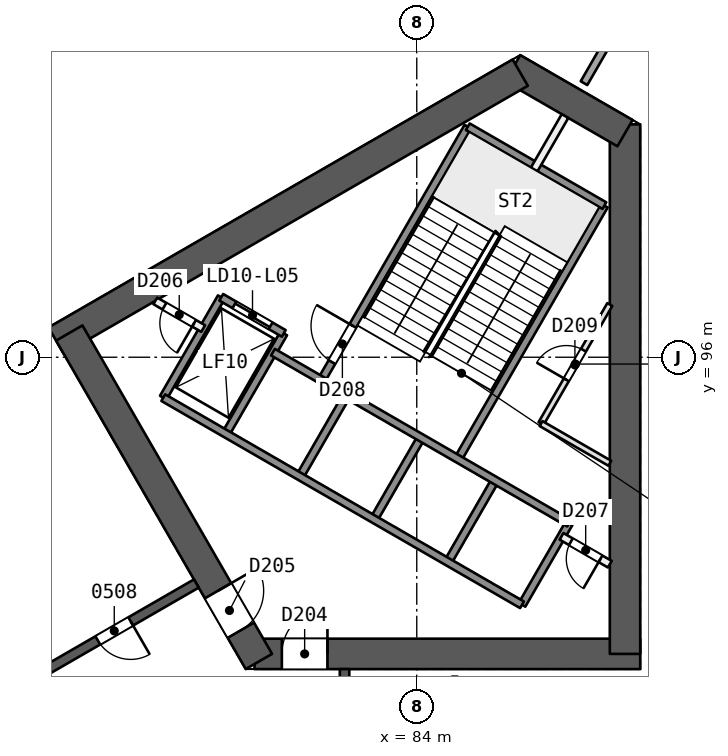
"""IFC4 building model, lengths in metres.
Left out: names, types, materials, properties, quantities, classifications, styles, units other than length and angle.
Written with IfcOpenShell. Run it as: python <this file> out.ifc"""

import sys

from ifc_helpers import new_model, si_unit, direction, frame, frame_2d, origin, place, context, subcontext, project, spatial, rectangle, extrude, element, fill, save


model = new_model("IFC4")
c1 = context("Model", 3, precision=1e-05, world=origin(), true_north=direction((0.0, 1.0)))
c2 = subcontext(c1, "Body", "Model", "MODEL_VIEW")
j1 = project(units=[si_unit("LENGTHUNIT", "METRE"), si_unit("PLANEANGLEUNIT", "RADIAN")], contexts=[c1])
p1 = place(None, origin())
s1 = spatial("IfcSite", under=j1, at=p1, CompositionType="ELEMENT")
p2 = place(p1, origin())
s2 = spatial("IfcBuilding", under=s1, at=p2, CompositionType="ELEMENT")
p3 = place(p2, frame((0.0, 0.0, 30.0)))
s3 = spatial("IfcBuildingStorey", under=s2, at=p3, CompositionType="ELEMENT", Elevation=30.0)
p4 = place(p3, frame((79.731, 88.194, 0.0), z_axis=(0.0, 0.0, 1.0), x_axis=(1.0, 0.0, 0.0)))
e1 = element("IfcWall", 1, at=p4, inside=s3, PredefinedType="SHEAR", context=c2, shape_type="SweptSolid", body=[
    extrude(rectangle(XDim=10.149, YDim=0.8, at=frame_2d((5.074, 0.0))), origin(), (0.0, 0.0, 1.0), 3.7),
])
p5 = place(p4, frame((0.719, 0.0, 0.0)))
e2 = element("IfcOpeningElement", 2, at=p5, cuts=e1, PredefinedType="OPENING", context=c2, shape_type="SweptSolid", body=[
    extrude(rectangle(XDim=1.2, YDim=2.1, at=frame_2d((0.6, 1.05))), frame((0.0, 0.411, 0.0), z_axis=(0.0, -1.0, 0.0), x_axis=(1.0, 0.0, 0.0)), (0.0, 0.0, 1.0), 0.821),
])
p6 = place(p3, frame((89.48, 88.194, 0.0), z_axis=(0.0, 0.0, 1.0), x_axis=(0.0, 1.0, 0.0)))
e3 = element("IfcWall", 3, at=p6, inside=s3, PredefinedType="SHEAR", context=c2, shape_type="SweptSolid", body=[
    extrude(rectangle(XDim=13.933, YDim=0.8, at=frame_2d((6.967, 0.0))), origin(), (0.0, 0.0, 1.0), 3.7),
])
p7 = place(p3, frame((89.48, 101.897, 0.0), z_axis=(0.0, 0.0, 1.0), x_axis=(-0.866034355626, 0.499984494636, 0.0)))
e4 = element("IfcWall", 4, at=p7, inside=s3, PredefinedType="SHEAR", context=c2, shape_type="SweptSolid", body=[
    extrude(rectangle(XDim=3.414, YDim=0.8, at=frame_2d((1.707, 0.0))), origin(), (0.0, 0.0, 1.0), 3.7),
])
p8 = place(p3, frame((86.723, 103.488, 0.0), z_axis=(0.0, 0.0, 1.0), x_axis=(-0.866032504327, -0.499987701298, 0.0)))
e5 = element("IfcWall", 5, at=p8, inside=s3, PredefinedType="SHEAR", context=c2, shape_type="SweptSolid", body=[
    extrude(rectangle(XDim=14.102, YDim=0.8, at=frame_2d((7.051, 0.0))), origin(), (0.0, 0.0, 1.0), 3.7),
])
p9 = place(p3, frame((74.856, 96.637, 0.0), z_axis=(0.0, 0.0, 1.0), x_axis=(0.499993500917, -0.866029155999, 0.0)))
e6 = element("IfcWall", 6, at=p9, inside=s3, PredefinedType="SHEAR", context=c2, shape_type="SweptSolid", body=[
    extrude(rectangle(XDim=9.98, YDim=0.8, at=frame_2d((4.99, 0.0))), origin(), (0.0, 0.0, 1.0), 3.7),
])
p10 = place(p9, frame((7.83, 0.0, 0.0)))
e7 = element("IfcOpeningElement", 7, at=p10, cuts=e6, PredefinedType="OPENING", context=c2, shape_type="SweptSolid", body=[
    extrude(rectangle(XDim=1.2, YDim=2.1, at=frame_2d((0.6, 1.05))), frame((0.0, 0.411, 0.0), z_axis=(0.0, -1.0, 0.0), x_axis=(1.0, 0.0, 0.0)), (0.0, 0.0, 1.0), 0.821),
])
p11 = place(p3, frame((82.1, 72.206, 0.0), z_axis=(0.0, 0.0, 1.0), x_axis=(0.0, 1.0, 0.0)))
e8 = element("IfcWall", 8, at=p11, inside=s3, PredefinedType="SHEAR", context=c2, shape_type="SweptSolid", body=[
    extrude(rectangle(XDim=15.588, YDim=0.25, at=frame_2d((7.794, 0.0))), origin(), (0.0, 0.0, 1.0), 3.2),
])
p12 = place(p11, frame((2.618, 0.0, 0.0)))
e9 = element("IfcOpeningElement", 9, at=p12, cuts=e8, PredefinedType="OPENING", context=c2, shape_type="SweptSolid", body=[
    extrude(rectangle(XDim=1.0, YDim=2.1, at=frame_2d((0.5, 1.05))), frame((0.0, 0.135, 0.0), z_axis=(0.0, -1.0, 0.0), x_axis=(1.0, 0.0, 0.0)), (0.0, 0.0, 1.0), 0.271),
])
p13 = place(p11, frame((9.25, 0.0, 0.0)))
e10 = element("IfcOpeningElement", 10, at=p13, cuts=e8, PredefinedType="OPENING", context=c2, shape_type="SweptSolid", body=[
    extrude(rectangle(XDim=1.1, YDim=2.1, at=frame_2d((0.55, 1.05))), frame((0.0, 0.135, 0.0), z_axis=(0.0, -1.0, 0.0), x_axis=(1.0, 0.0, 0.0)), (0.0, 0.0, 1.0), 0.271),
])
p14 = place(p11, frame((11.294, 0.0, 0.0)))
e11 = element("IfcOpeningElement", 11, at=p14, cuts=e8, PredefinedType="OPENING", context=c2, shape_type="SweptSolid", body=[
    extrude(rectangle(XDim=1.0, YDim=2.1, at=frame_2d((0.5, 1.05))), frame((0.0, 0.135, 0.0), z_axis=(0.0, -1.0, 0.0), x_axis=(1.0, 0.0, 0.0)), (0.0, 0.0, 1.0), 0.271),
])
p15 = place(p3, frame((78.2, 90.046, 0.0), z_axis=(0.0, 0.0, 1.0), x_axis=(-0.866026492143, -0.499998114903, 0.0)))
e12 = element("IfcWall", 12, at=p15, inside=s3, PredefinedType="SHEAR", context=c2, shape_type="SweptSolid", body=[
    extrude(rectangle(XDim=15.588, YDim=0.25, at=frame_2d((7.794, 0.0))), origin(), (0.0, 0.0, 1.0), 3.2),
])
p16 = place(p15, frame((1.994, 0.0, 0.0)))
e13 = element("IfcOpeningElement", 13, at=p16, cuts=e12, PredefinedType="OPENING", context=c2, shape_type="SweptSolid", body=[
    extrude(rectangle(XDim=1.0, YDim=2.1, at=frame_2d((0.5, 1.05))), frame((0.0, 0.135, 0.0), z_axis=(0.0, -1.0, 0.0), x_axis=(1.0, 0.0, 0.0)), (0.0, 0.0, 1.0), 0.271),
])
p17 = place(p15, frame((8.85, 0.0, 0.0)))
e14 = element("IfcOpeningElement", 14, at=p17, cuts=e12, PredefinedType="OPENING", context=c2, shape_type="SweptSolid", body=[
    extrude(rectangle(XDim=1.1, YDim=2.1, at=frame_2d((0.55, 1.05))), frame((0.0, 0.135, 0.0), z_axis=(0.0, -1.0, 0.0), x_axis=(1.0, 0.0, 0.0)), (0.0, 0.0, 1.0), 0.271),
])
p18 = place(p15, frame((12.75, 0.0, 0.0)))
e15 = element("IfcOpeningElement", 15, at=p18, cuts=e12, PredefinedType="OPENING", context=c2, shape_type="SweptSolid", body=[
    extrude(rectangle(XDim=1.0, YDim=2.1, at=frame_2d((0.5, 1.05))), frame((0.0, 0.135, 0.0), z_axis=(0.0, -1.0, 0.0), x_axis=(1.0, 0.0, 0.0)), (0.0, 0.0, 1.0), 0.271),
])
p19 = place(p3, frame((85.0, 87.595, 0.0), z_axis=(0.0, 0.0, 1.0), x_axis=(0.0, -1.0, 0.0)))
e16 = element("IfcWall", 16, at=p19, inside=s3, PredefinedType="PARTITIONING", context=c2, shape_type="SweptSolid", body=[
    extrude(rectangle(XDim=2.401, YDim=0.15, at=frame_2d((1.2, 0.0))), origin(), (0.0, 0.0, 1.0), 3.2),
])
p20 = place(p3, frame((93.686, 112.365, 0.0), z_axis=(0.0, 0.0, 1.0), x_axis=(-0.499997037832, -0.866027113986, 0.0)))
e17 = element("IfcWall", 17, at=p20, inside=s3, PredefinedType="PARTITIONING", context=c2, shape_type="SweptSolid", body=[
    extrude(rectangle(XDim=10.57, YDim=0.2, at=frame_2d((5.285, 0.0))), origin(), (0.0, 0.0, 1.0), 3.2),
])
p21 = place(p3, frame((37.479, 83.163, 0.0), z_axis=(0.0, 0.0, 1.0), x_axis=(0.866024340432, 0.500001841776, 0.0)))
e18 = element("IfcWall", 18, at=p21, inside=s3, PredefinedType="SOLIDWALL", context=c2, shape_type="SweptSolid", body=[
    extrude(rectangle(XDim=61.824, YDim=0.3, at=frame_2d((30.912, 0.0))), origin(), (0.0, 0.0, 1.0), 3.2),
])
p22 = place(p21, frame((29.556, 0.0, 0.0)))
e19 = element("IfcOpeningElement", 19, at=p22, cuts=e18, PredefinedType="OPENING", context=c2, shape_type="SweptSolid", body=[
    extrude(rectangle(XDim=2.4, YDim=2.4, at=frame_2d((1.2, 1.2))), frame((0.0, 0.161, 0.0), z_axis=(0.0, -1.0, 0.0), x_axis=(1.0, 0.0, 0.0)), (0.0, 0.0, 1.0), 0.321),
])
p23 = place(p21, frame((35.012, 0.0, 0.0)))
e20 = element("IfcOpeningElement", 20, at=p23, cuts=e18, PredefinedType="OPENING", context=c2, shape_type="SweptSolid", body=[
    extrude(rectangle(XDim=2.4, YDim=2.4, at=frame_2d((1.2, 1.2))), frame((0.0, 0.161, 0.0), z_axis=(0.0, -1.0, 0.0), x_axis=(1.0, 0.0, 0.0)), (0.0, 0.0, 1.0), 0.321),
])
p24 = place(p21, frame((47.93, 0.0, 0.0)))
e21 = element("IfcOpeningElement", 21, at=p24, cuts=e18, PredefinedType="OPENING", context=c2, shape_type="SweptSolid", body=[
    extrude(rectangle(XDim=2.4, YDim=2.4, at=frame_2d((1.2, 1.2))), frame((0.0, 0.161, 0.0), z_axis=(0.0, -1.0, 0.0), x_axis=(1.0, 0.0, 0.0)), (0.0, 0.0, 1.0), 0.321),
])
p25 = place(p21, frame((24.256, 0.0, 0.0)))
e22 = element("IfcOpeningElement", 22, at=p25, cuts=e18, PredefinedType="OPENING", context=c2, shape_type="SweptSolid", body=[
    extrude(rectangle(XDim=2.4, YDim=2.4, at=frame_2d((1.2, 1.2))), frame((0.0, 0.161, 0.0), z_axis=(0.0, -1.0, 0.0), x_axis=(1.0, 0.0, 0.0)), (0.0, 0.0, 1.0), 0.321),
])
p26 = place(p21, frame((11.509, 0.0, 0.0)))
e23 = element("IfcOpeningElement", 23, at=p26, cuts=e18, PredefinedType="OPENING", context=c2, shape_type="SweptSolid", body=[
    extrude(rectangle(XDim=2.4, YDim=2.4, at=frame_2d((1.2, 1.2))), frame((0.0, 0.161, 0.0), z_axis=(0.0, -1.0, 0.0), x_axis=(1.0, 0.0, 0.0)), (0.0, 0.0, 1.0), 0.321),
])
p27 = place(p3, frame((86.77, 89.486, 0.0), z_axis=(0.0, 0.0, 1.0), x_axis=(0.499961042966, 0.86604789447, 0.0)))
e24 = element("IfcWall", 24, at=p27, inside=s3, PredefinedType="SOLIDWALL", context=c2, shape_type="SweptSolid", body=[
    extrude(rectangle(XDim=2.48, YDim=0.2, at=frame_2d((1.24, 0.0))), origin(), (0.0, 0.0, 1.0), 3.2),
])
p28 = place(p3, frame((87.271, 94.254, 0.0), z_axis=(0.0, 0.0, 1.0), x_axis=(0.500043727655, 0.866000156139, 0.0)))
e25 = element("IfcWall", 25, at=p28, inside=s3, PredefinedType="PARTITIONING", context=c2, shape_type="SweptSolid", body=[
    extrude(rectangle(XDim=3.618, YDim=0.15, at=frame_2d((1.809, 0.0))), origin(), (0.0, 0.0, 1.0), 3.2),
])
p29 = place(p28, frame((1.332, 0.0, 0.0)))
e26 = element("IfcOpeningElement", 26, at=p29, cuts=e25, PredefinedType="OPENING", context=c2, shape_type="SweptSolid", body=[
    extrude(rectangle(XDim=0.9, YDim=2.1, at=frame_2d((0.45, 1.05))), frame((0.0, 0.085, 0.0), z_axis=(0.0, -1.0, 0.0), x_axis=(1.0, 0.0, 0.0)), (0.0, 0.0, 1.0), 0.171),
])
p30 = place(p3, frame((84.821, 90.611, 0.0), z_axis=(0.0, 0.0, 1.0), x_axis=(0.499961042966, 0.86604789447, 0.0)))
e27 = element("IfcWall", 27, at=p30, inside=s3, PredefinedType="SOLIDWALL", context=c2, shape_type="SweptSolid", body=[
    extrude(rectangle(XDim=2.48, YDim=0.2, at=frame_2d((1.24, 0.0))), origin(), (0.0, 0.0, 1.0), 3.2),
])
p31 = place(p3, frame((85.087, 93.321, 0.0), z_axis=(0.0, 0.0, 1.0), x_axis=(0.500019787375, 0.866013979237, 0.0)))
e28 = element("IfcWall", 28, at=p31, inside=s3, PredefinedType="SOLIDWALL", context=c2, shape_type="SweptSolid", body=[
    extrude(rectangle(XDim=7.7, YDim=0.2, at=frame_2d((3.85, 0.0))), origin(), (0.0, 0.0, 1.0), 3.2),
])
p32 = place(p3, frame((82.873, 91.736, 0.0), z_axis=(0.0, 0.0, 1.0), x_axis=(0.499961042966, 0.86604789447, 0.0)))
e29 = element("IfcWall", 29, at=p32, inside=s3, PredefinedType="SOLIDWALL", context=c2, shape_type="SweptSolid", body=[
    extrude(rectangle(XDim=2.48, YDim=0.2, at=frame_2d((1.24, 0.0))), origin(), (0.0, 0.0, 1.0), 3.2),
])
p33 = place(p3, frame((87.09, 100.94, 0.0), z_axis=(0.0, 0.0, 1.0), x_axis=(0.499956811548, 0.866050337213, 0.0)))
e30 = element("IfcWall", 30, at=p33, inside=s3, PredefinedType="PARTITIONING", context=c2, shape_type="SweptSolid", body=[
    extrude(rectangle(XDim=1.623, YDim=0.2, at=frame_2d((0.812, 0.0))), origin(), (0.0, 0.0, 1.0), 3.2),
])
p34 = place(p3, frame((80.924, 92.861, 0.0), z_axis=(0.0, 0.0, 1.0), x_axis=(0.499961042966, 0.86604789447, 0.0)))
e31 = element("IfcWall", 31, at=p34, inside=s3, PredefinedType="SOLIDWALL", context=c2, shape_type="SweptSolid", body=[
    extrude(rectangle(XDim=2.48, YDim=0.2, at=frame_2d((1.24, 0.0))), origin(), (0.0, 0.0, 1.0), 3.2),
])
p35 = place(p3, frame((81.493, 95.396, 0.0), z_axis=(0.0, 0.0, 1.0), x_axis=(0.500006057782, 0.866021906294, 0.0)))
e32 = element("IfcWall", 32, at=p35, inside=s3, PredefinedType="SOLIDWALL", context=c2, shape_type="SweptSolid", body=[
    extrude(rectangle(XDim=7.7, YDim=0.2, at=frame_2d((3.85, 0.0))), origin(), (0.0, 0.0, 1.0), 3.2),
])
p36 = place(p35, frame((0.55, 0.0, 0.0)))
e33 = element("IfcOpeningElement", 33, at=p36, cuts=e32, PredefinedType="OPENING", context=c2, shape_type="SweptSolid", body=[
    extrude(rectangle(XDim=1.1, YDim=2.1, at=frame_2d((0.55, 1.05))), frame((0.0, 0.11, 0.0), z_axis=(0.0, -1.0, 0.0), x_axis=(1.0, 0.0, 0.0)), (0.0, 0.0, 1.0), 0.221),
])
for number, where, z_axis, x_axis in (
    (34, (78.976, 93.986, 0.0), (0.0, 0.0, 1.0), (0.5, 0.866, 0.0)),
    (35, (77.33, 94.936, 0.0), (0.0, 0.0, 1.0), (0.5, 0.866, 0.0)),
):
    element("IfcWall", number, at=place(p3, frame(where, z_axis=z_axis, x_axis=x_axis)), inside=s3, PredefinedType="SOLIDWALL", context=c2, shape_type="SweptSolid", body=[
        extrude(rectangle(XDim=3.05, YDim=0.2, at=frame_2d((1.525, 0.0))), origin(), (0.0, 0.0, 1.0), 3.2),
    ])
p37 = place(p3, frame((86.77, 89.486, 0.0), z_axis=(0.0, 0.0, 1.0), x_axis=(-0.86601811187, 0.500012629753, 0.0)))
e36 = element("IfcWall", 36, at=p37, inside=s3, PredefinedType="SOLIDWALL", context=c2, shape_type="SweptSolid", body=[
    extrude(rectangle(XDim=10.9, YDim=0.2, at=frame_2d((5.45, 0.0))), origin(), (0.0, 0.0, 1.0), 3.2),
])
p38 = place(p3, frame((89.08, 90.554, 0.0), z_axis=(0.0, 0.0, 1.0), x_axis=(-0.866022048785, 0.500005810984, 0.0)))
e37 = element("IfcWall", 37, at=p38, inside=s3, PredefinedType="PARTITIONING", context=c2, shape_type="SweptSolid", body=[
    extrude(rectangle(XDim=1.467, YDim=0.2, at=frame_2d((0.733, 0.0))), origin(), (0.0, 0.0, 1.0), 3.2),
])
p39 = place(p38, frame((0.283, 0.0, 0.0)))
e38 = element("IfcOpeningElement", 38, at=p39, cuts=e37, PredefinedType="OPENING", context=c2, shape_type="SweptSolid", body=[
    extrude(rectangle(XDim=0.9, YDim=2.1, at=frame_2d((0.45, 1.05))), frame((0.0, 0.11, 0.0), z_axis=(0.0, -1.0, 0.0), x_axis=(1.0, 0.0, 0.0)), (0.0, 0.0, 1.0), 0.221),
])
p40 = place(p3, frame((78.38, 96.755, 0.0), z_axis=(0.0, 0.0, 1.0), x_axis=(-0.866003949776, 0.500037157592, 0.0)))
e39 = element("IfcWall", 39, at=p40, inside=s3, PredefinedType="PARTITIONING", context=c2, shape_type="SweptSolid", body=[
    extrude(rectangle(XDim=1.455, YDim=0.2, at=frame_2d((0.728, 0.0))), origin(), (0.0, 0.0, 1.0), 3.2),
])
p41 = place(p40, frame((0.278, 0.0, 0.0)))
e40 = element("IfcOpeningElement", 40, at=p41, cuts=e39, PredefinedType="OPENING", context=c2, shape_type="SweptSolid", body=[
    extrude(rectangle(XDim=0.9, YDim=2.1, at=frame_2d((0.45, 1.05))), frame((0.0, 0.11, 0.0), z_axis=(0.0, -1.0, 0.0), x_axis=(1.0, 0.0, 0.0)), (0.0, 0.0, 1.0), 0.221),
])
p42 = place(p3, frame((88.01, 91.634, 0.0), z_axis=(0.0, 0.0, 1.0), x_axis=(-0.866024315419, 0.5000018851, 0.0)))
e41 = element("IfcWall", 41, at=p42, inside=s3, PredefinedType="SOLIDWALL", context=c2, shape_type="SweptSolid", body=[
    extrude(rectangle(XDim=9.0, YDim=0.2, at=frame_2d((4.5, 0.0))), origin(), (0.0, 0.0, 1.0), 3.2),
])
p43 = place(p3, frame((80.5, 96.627, 0.0), z_axis=(0.0, 0.0, 1.0), x_axis=(-0.86601224135, 0.500022797313, 0.0)))
e42 = element("IfcWall", 42, at=p43, inside=s3, PredefinedType="SOLIDWALL", context=c2, shape_type="SweptSolid", body=[
    extrude(rectangle(XDim=1.9, YDim=0.2, at=frame_2d((0.95, 0.0))), origin(), (0.0, 0.0, 1.0), 3.2),
])
p44 = place(p43, frame((0.4, 0.0, 0.0)))
e43 = element("IfcOpeningElement", 43, at=p44, cuts=e42, PredefinedType="OPENING", context=c2, shape_type="SweptSolid", body=[
    extrude(rectangle(XDim=1.1, YDim=2.1, at=frame_2d((0.55, 1.05))), frame((0.0, 0.11, 0.0), z_axis=(0.0, -1.0, 0.0), x_axis=(1.0, 0.0, 0.0)), (0.0, 0.0, 1.0), 0.221),
])
p45 = place(p3, frame((89.08, 93.21, 0.0), z_axis=(0.0, 0.0, 1.0), x_axis=(-0.866033778982, 0.499985493453, 0.0)))
e44 = element("IfcWall", 44, at=p45, inside=s3, PredefinedType="PARTITIONING", context=c2, shape_type="SweptSolid", body=[
    extrude(rectangle(XDim=2.089, YDim=0.15, at=frame_2d((1.044, 0.0))), origin(), (0.0, 0.0, 1.0), 3.2),
])
p46 = place(p3, frame((88.937, 99.99, 0.0), z_axis=(0.0, 0.0, 1.0), x_axis=(-0.866004344652, 0.500036473714, 0.0)))
e45 = element("IfcWall", 45, at=p46, inside=s3, PredefinedType="SOLIDWALL", context=c2, shape_type="SweptSolid", body=[
    extrude(rectangle(XDim=4.15, YDim=0.2, at=frame_2d((2.075, 0.0))), origin(), (0.0, 0.0, 1.0), 3.2),
])
p47 = place(p16, origin())
e46 = element("IfcDoor", 46, at=p47, inside=s3, OperationType="SINGLE_SWING_LEFT", PredefinedType="NOTDEFINED", context=c2, shape_type="SweptSolid", body=[
    extrude(rectangle(XDim=1.0, YDim=2.1, at=frame_2d((0.5, 1.05))), frame((0.0, 0.025, 0.0), z_axis=(0.0, -1.0, 0.0), x_axis=(1.0, 0.0, 0.0)), (0.0, 0.0, 1.0), 0.05),
])
fill(e13, e46)
p48 = place(p5, origin())
e47 = element("IfcDoor", 47, at=p48, inside=s3, OperationType="SINGLE_SWING_RIGHT", PredefinedType="NOTDEFINED", context=c2, shape_type="SweptSolid", body=[
    extrude(rectangle(XDim=1.2, YDim=2.1, at=frame_2d((0.6, 1.05))), frame((0.0, 0.025, 0.0), z_axis=(0.0, -1.0, 0.0), x_axis=(1.0, 0.0, 0.0)), (0.0, 0.0, 1.0), 0.05),
])
fill(e2, e47)
p49 = place(p10, origin())
e48 = element("IfcDoor", 48, at=p49, inside=s3, OperationType="SINGLE_SWING_LEFT", PredefinedType="NOTDEFINED", context=c2, shape_type="SweptSolid", body=[
    extrude(rectangle(XDim=1.2, YDim=2.1, at=frame_2d((0.6, 1.05))), frame((0.0, 0.025, 0.0), z_axis=(0.0, -1.0, 0.0), x_axis=(1.0, 0.0, 0.0)), (0.0, 0.0, 1.0), 0.05),
])
fill(e7, e48)
p50 = place(p44, origin())
e49 = element("IfcDoor", 49, at=p50, inside=s3, OperationType="SLIDING_TO_RIGHT", PredefinedType="NOTDEFINED", context=c2, shape_type="SweptSolid", body=[
    extrude(rectangle(XDim=1.1, YDim=2.1, at=frame_2d((0.55, 1.05))), frame((0.0, 0.025, 0.0), z_axis=(0.0, -1.0, 0.0), x_axis=(1.0, 0.0, 0.0)), (0.0, 0.0, 1.0), 0.05),
])
fill(e43, e49)
p51 = place(p41, origin())
e50 = element("IfcDoor", 50, at=p51, inside=s3, OperationType="SINGLE_SWING_LEFT", PredefinedType="NOTDEFINED", context=c2, shape_type="SweptSolid", body=[
    extrude(rectangle(XDim=0.9, YDim=2.1, at=frame_2d((0.45, 1.05))), frame((0.0, 0.025, 0.0), z_axis=(0.0, -1.0, 0.0), x_axis=(1.0, 0.0, 0.0)), (0.0, 0.0, 1.0), 0.05),
])
fill(e40, e50)
p52 = place(p39, origin())
e51 = element("IfcDoor", 51, at=p52, inside=s3, OperationType="SINGLE_SWING_LEFT", PredefinedType="NOTDEFINED", context=c2, shape_type="SweptSolid", body=[
    extrude(rectangle(XDim=0.9, YDim=2.1, at=frame_2d((0.45, 1.05))), frame((0.0, 0.025, 0.0), z_axis=(0.0, -1.0, 0.0), x_axis=(1.0, 0.0, 0.0)), (0.0, 0.0, 1.0), 0.05),
])
fill(e38, e51)
p53 = place(p36, origin())
e52 = element("IfcDoor", 52, at=p53, inside=s3, OperationType="SINGLE_SWING_RIGHT", PredefinedType="NOTDEFINED", context=c2, shape_type="SweptSolid", body=[
    extrude(rectangle(XDim=1.1, YDim=2.1, at=frame_2d((0.55, 1.05))), frame((0.0, 0.025, 0.0), z_axis=(0.0, -1.0, 0.0), x_axis=(1.0, 0.0, 0.0)), (0.0, 0.0, 1.0), 0.05),
])
fill(e33, e52)
p54 = place(p29, origin())
e53 = element("IfcDoor", 53, at=p54, inside=s3, OperationType="SINGLE_SWING_LEFT", PredefinedType="NOTDEFINED", context=c2, shape_type="SweptSolid", body=[
    extrude(rectangle(XDim=0.9, YDim=2.1, at=frame_2d((0.45, 1.05))), frame((0.0, 0.025, 0.0), z_axis=(0.0, -1.0, 0.0), x_axis=(1.0, 0.0, 0.0)), (0.0, 0.0, 1.0), 0.05),
])
fill(e26, e53)
save(model, sys.argv[1])
